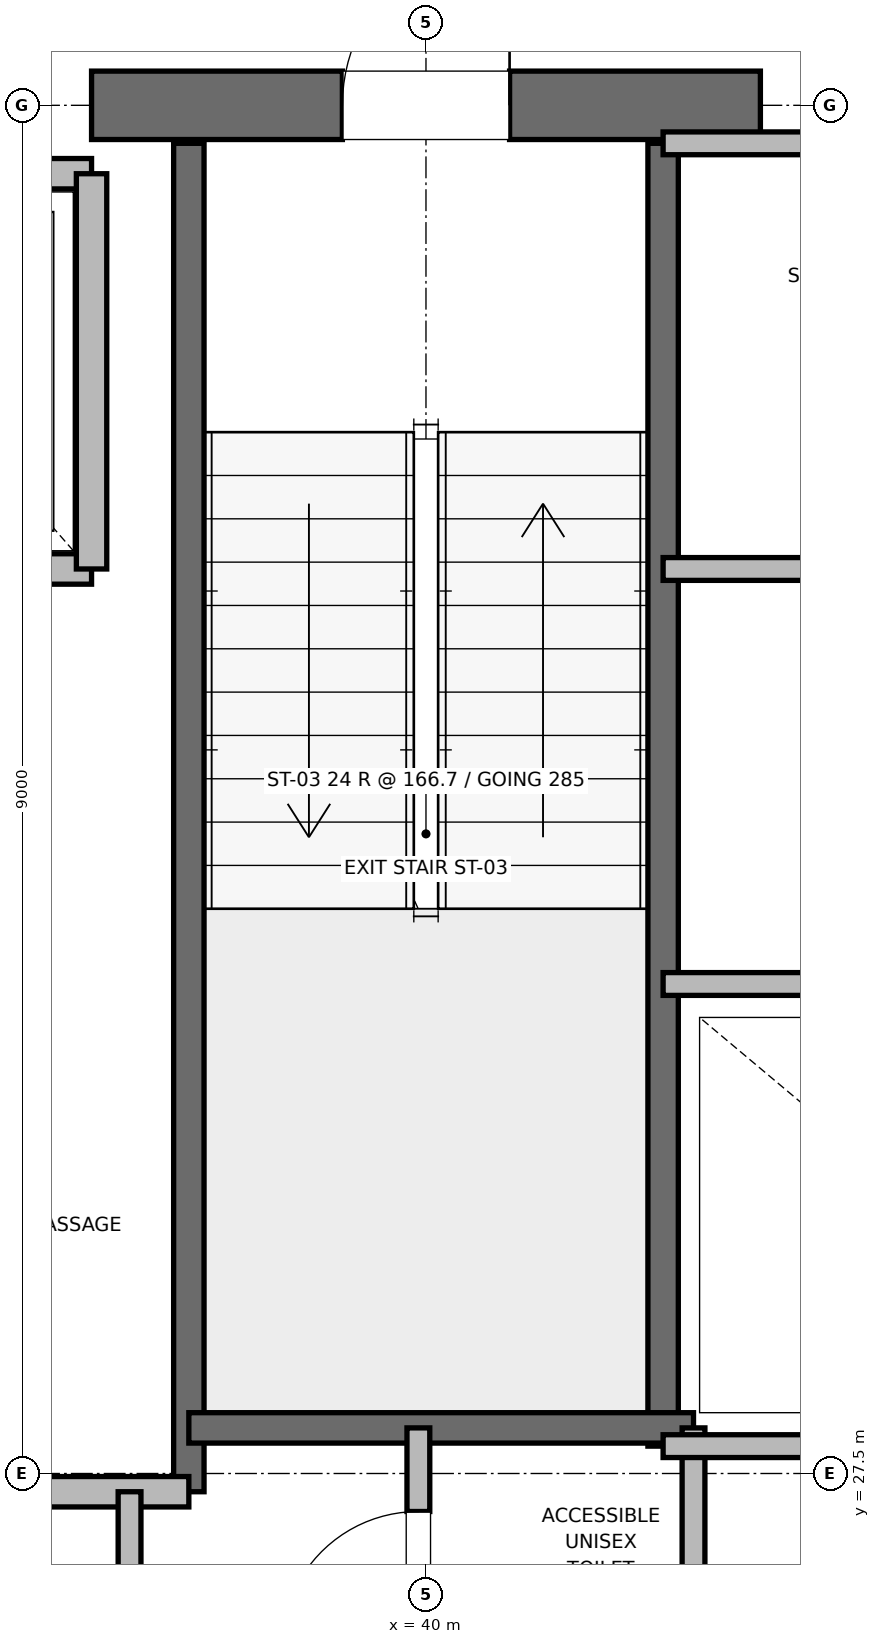
"""IFC4 building model, lengths in metres.
Left out: names, types, materials, properties, quantities, classifications, styles, units other than length and angle.
Written with IfcOpenShell. Run it as: python <this file> out.ifc"""

import sys

from ifc_helpers import new_model, si_unit, direction, frame, frame_2d, origin, place, context, subcontext, project, spatial, rectangle, extrude, element, fill, save


model = new_model("IFC4")
c1 = context("Model", 3, precision=1e-05, world=origin(), true_north=direction((0.0, 1.0)))
c2 = subcontext(c1, "Body", "Model", "MODEL_VIEW")
j1 = project(units=[si_unit("LENGTHUNIT", "METRE"), si_unit("PLANEANGLEUNIT", "RADIAN")], contexts=[c1])
p1 = place(None, origin())
s1 = spatial("IfcSite", under=j1, at=p1, CompositionType="ELEMENT")
p2 = place(p1, origin())
s2 = spatial("IfcBuilding", under=s1, at=p2, CompositionType="ELEMENT")
p3 = place(p2, frame((0.0, 0.0, 251.2)))
s3 = spatial("IfcBuildingStorey", under=s2, at=p3, CompositionType="ELEMENT", Elevation=251.2)
p4 = place(p3, frame((37.8, 36.5, 0.0), z_axis=(0.0, 0.0, 1.0), x_axis=(1.0, 0.0, 0.0)))
e1 = element("IfcWall", 1, at=p4, inside=s3, PredefinedType="SHEAR", context=c2, shape_type="SweptSolid", body=[
    extrude(rectangle(XDim=4.4, YDim=0.45, at=frame_2d((2.2, 0.0))), origin(), (0.0, 0.0, 1.0), 3.785),
])
p5 = place(p4, frame((1.65, 0.0, 0.0)))
e2 = element("IfcOpeningElement", 2, at=p5, cuts=e1, PredefinedType="OPENING", context=c2, shape_type="SweptSolid", body=[
    extrude(rectangle(XDim=1.1, YDim=2.15, at=frame_2d((0.55, 1.075))), frame((0.0, 0.225, 0.0), z_axis=(0.0, -1.0, 0.0), x_axis=(1.0, 0.0, 0.0)), (0.0, 0.0, 1.0), 0.45),
])
p6 = place(p3, frame((38.44, 27.38, 0.0), z_axis=(0.0, 0.0, 1.0), x_axis=(0.0, 1.0, 0.0)))
e3 = element("IfcWall", 3, at=p6, inside=s3, PredefinedType="SOLIDWALL", context=c2, shape_type="SweptSolid", body=[
    extrude(rectangle(XDim=8.87, YDim=0.2, at=frame_2d((4.435, 0.0))), origin(), (0.0, 0.0, 1.0), 3.785),
])
p7 = place(p3, frame((41.56, 27.68, 0.0), z_axis=(0.0, 0.0, 1.0), x_axis=(0.0, 1.0, 0.0)))
e4 = element("IfcWall", 4, at=p7, inside=s3, PredefinedType="SOLIDWALL", context=c2, shape_type="SweptSolid", body=[
    extrude(rectangle(XDim=8.57, YDim=0.2, at=frame_2d((4.285, 0.0))), origin(), (0.0, 0.0, 1.0), 3.785),
])
p8 = place(p3, frame((38.44, 27.8, 0.0), z_axis=(0.0, 0.0, 1.0), x_axis=(1.0, 0.0, 0.0)))
e5 = element("IfcWall", 5, at=p8, inside=s3, PredefinedType="SOLIDWALL", context=c2, shape_type="SweptSolid", body=[
    extrude(rectangle(XDim=3.32, YDim=0.2, at=frame_2d((1.66, 0.0))), origin(), (0.0, 0.0, 1.0), 3.785),
])
p9 = place(p3, frame((32.82, 27.38, 0.0), z_axis=(0.0, 0.0, 1.0), x_axis=(1.0, 0.0, 0.0)))
e6 = element("IfcWall", 6, at=p9, inside=s3, PredefinedType="PARTITIONING", context=c2, shape_type="SweptSolid", body=[
    extrude(rectangle(XDim=5.62, YDim=0.2, at=frame_2d((2.81, 0.0))), origin(), (0.0, 0.0, 1.0), 3.785),
])
p10 = place(p3, frame((35.5, 33.45, 0.0), z_axis=(0.0, 0.0, 1.0), x_axis=(1.0, 0.0, 0.0)))
e7 = element("IfcWall", 7, at=p10, inside=s3, PredefinedType="SOLIDWALL", context=c2, shape_type="SweptSolid", body=[
    extrude(rectangle(XDim=2.3, YDim=0.2, at=frame_2d((1.15, 0.0))), origin(), (0.0, 0.0, 1.0), 3.785),
])
p11 = place(p10, frame((0.6, 0.0, 0.0)))
e8 = element("IfcOpeningElement", 8, at=p11, cuts=e7, PredefinedType="OPENING", context=c2, shape_type="SweptSolid", body=[
    extrude(rectangle(XDim=1.1, YDim=2.2, at=frame_2d((0.55, 1.1))), frame((0.0, 0.1, 0.0), z_axis=(0.0, -1.0, 0.0), x_axis=(1.0, 0.0, 0.0)), (0.0, 0.0, 1.0), 0.2),
])
p12 = place(p3, frame((37.8, 36.05, 0.0), z_axis=(0.0, 0.0, 1.0), x_axis=(-1.0, 0.0, 0.0)))
e9 = element("IfcWall", 9, at=p12, inside=s3, PredefinedType="SOLIDWALL", context=c2, shape_type="SweptSolid", body=[
    extrude(rectangle(XDim=2.3, YDim=0.2, at=frame_2d((1.15, 0.0))), origin(), (0.0, 0.0, 1.0), 2.865),
])
p13 = place(p3, frame((37.8, 33.45, 0.0), z_axis=(0.0, 0.0, 1.0), x_axis=(0.0, 1.0, 0.0)))
e10 = element("IfcWall", 10, at=p13, inside=s3, PredefinedType="SOLIDWALL", context=c2, shape_type="SweptSolid", body=[
    extrude(rectangle(XDim=2.6, YDim=0.2, at=frame_2d((1.3, 0.0))), origin(), (0.0, 0.0, 1.0), 2.865),
])
p14 = place(p3, frame((41.76, 23.8, 0.0), z_axis=(0.0, 0.0, 1.0), x_axis=(0.0, 1.0, 0.0)))
e11 = element("IfcWall", 11, at=p14, inside=s3, PredefinedType="PARTITIONING", context=c2, shape_type="SweptSolid", body=[
    extrude(rectangle(XDim=4.0, YDim=0.15, at=frame_2d((2.0, 0.0))), origin(), (0.0, 0.0, 1.0), 2.85),
])
p15 = place(p3, frame((39.95, 25.8, 0.0), z_axis=(0.0, 0.0, 1.0), x_axis=(0.0, 1.0, 0.0)))
e12 = element("IfcWall", 12, at=p15, inside=s3, PredefinedType="PARTITIONING", context=c2, shape_type="SweptSolid", body=[
    extrude(rectangle(XDim=2.0, YDim=0.15, at=frame_2d((1.0, 0.0))), origin(), (0.0, 0.0, 1.0), 2.85),
])
p16 = place(p15, frame((0.55, 0.0, 0.0)))
e13 = element("IfcOpeningElement", 13, at=p16, cuts=e12, PredefinedType="OPENING", context=c2, shape_type="SweptSolid", body=[
    extrude(rectangle(XDim=0.9, YDim=2.1, at=frame_2d((0.45, 1.05))), frame((0.0, 0.075, 0.0), z_axis=(0.0, -1.0, 0.0), x_axis=(1.0, 0.0, 0.0)), (0.0, 0.0, 1.0), 0.15),
])
p17 = place(p3, frame((38.05, 18.6, 0.0), z_axis=(0.0, 0.0, 1.0), x_axis=(0.0, 1.0, 0.0)))
e14 = element("IfcWall", 14, at=p17, inside=s3, PredefinedType="PARTITIONING", context=c2, shape_type="SweptSolid", body=[
    extrude(rectangle(XDim=8.78, YDim=0.15, at=frame_2d((4.39, 0.0))), origin(), (0.0, 0.0, 1.0), 2.85),
])
p18 = place(p17, frame((3.89, 0.0, 0.0)))
e15 = element("IfcOpeningElement", 15, at=p18, cuts=e14, PredefinedType="OPENING", context=c2, shape_type="SweptSolid", body=[
    extrude(rectangle(XDim=1.0, YDim=2.15, at=frame_2d((0.5, 1.075))), frame((0.0, 0.075, 0.0), z_axis=(0.0, -1.0, 0.0), x_axis=(1.0, 0.0, 0.0)), (0.0, 0.0, 1.0), 0.15),
])
p19 = place(p3, frame((41.56, 27.68, 0.0), z_axis=(0.0, 0.0, 1.0), x_axis=(1.0, 0.0, 0.0)))
e16 = element("IfcWall", 16, at=p19, inside=s3, PredefinedType="PARTITIONING", context=c2, shape_type="SweptSolid", body=[
    extrude(rectangle(XDim=3.59, YDim=0.15, at=frame_2d((1.795, 0.0))), origin(), (0.0, 0.0, 1.0), 2.85),
])
p20 = place(p3, frame((41.56, 30.72, 0.0), z_axis=(0.0, 0.0, 1.0), x_axis=(1.0, 0.0, 0.0)))
e17 = element("IfcWall", 17, at=p20, inside=s3, PredefinedType="PARTITIONING", context=c2, shape_type="SweptSolid", body=[
    extrude(rectangle(XDim=3.59, YDim=0.15, at=frame_2d((1.795, 0.0))), origin(), (0.0, 0.0, 1.0), 2.85),
])
p21 = place(p20, frame((1.355, 0.0, 0.0)))
e18 = element("IfcOpeningElement", 18, at=p21, cuts=e17, PredefinedType="OPENING", context=c2, shape_type="SweptSolid", body=[
    extrude(rectangle(XDim=0.88, YDim=2.1, at=frame_2d((0.44, 1.05))), frame((0.0, 0.075, 0.0), z_axis=(0.0, -1.0, 0.0), x_axis=(1.0, 0.0, 0.0)), (0.0, 0.0, 1.0), 0.15),
])
p22 = place(p3, frame((41.56, 36.25, 0.0), z_axis=(0.0, 0.0, 1.0), x_axis=(1.0, 0.0, 0.0)))
e19 = element("IfcWall", 19, at=p22, inside=s3, PredefinedType="PARTITIONING", context=c2, shape_type="SweptSolid", body=[
    extrude(rectangle(XDim=2.94, YDim=0.15, at=frame_2d((1.47, 0.0))), origin(), (0.0, 0.0, 1.0), 2.85),
])
p23 = place(p3, frame((41.56, 33.45, 0.0), z_axis=(0.0, 0.0, 1.0), x_axis=(1.0, 0.0, 0.0)))
e20 = element("IfcWall", 20, at=p23, inside=s3, PredefinedType="PARTITIONING", context=c2, shape_type="SweptSolid", body=[
    extrude(rectangle(XDim=2.94, YDim=0.15, at=frame_2d((1.47, 0.0))), origin(), (0.0, 0.0, 1.0), 2.85),
])
p24 = place(p23, frame((1.03, 0.0, 0.0)))
e21 = element("IfcOpeningElement", 21, at=p24, cuts=e20, PredefinedType="OPENING", context=c2, shape_type="SweptSolid", body=[
    extrude(rectangle(XDim=0.88, YDim=2.1, at=frame_2d((0.44, 1.05))), frame((0.0, 0.075, 0.0), z_axis=(0.0, -1.0, 0.0), x_axis=(1.0, 0.0, 0.0)), (0.0, 0.0, 1.0), 0.15),
])
p25 = place(p5, origin())
e22 = element("IfcDoor", 22, at=p25, inside=s3, OperationType="SINGLE_SWING_RIGHT", PredefinedType="DOOR", context=c2, shape_type="SweptSolid", body=[
    extrude(rectangle(XDim=1.1, YDim=2.15, at=frame_2d((0.55, 1.075))), frame((0.0, 0.025, 0.0), z_axis=(0.0, -1.0, 0.0), x_axis=(1.0, 0.0, 0.0)), (0.0, 0.0, 1.0), 0.05),
])
fill(e2, e22)
p26 = place(p16, origin())
e23 = element("IfcDoor", 23, at=p26, inside=s3, OperationType="SINGLE_SWING_LEFT", PredefinedType="DOOR", context=c2, shape_type="SweptSolid", body=[
    extrude(rectangle(XDim=0.9, YDim=2.1, at=frame_2d((0.45, 1.05))), frame((0.0, 0.025, 0.0), z_axis=(0.0, -1.0, 0.0), x_axis=(1.0, 0.0, 0.0)), (0.0, 0.0, 1.0), 0.05),
])
fill(e13, e23)
save(model, sys.argv[1])
